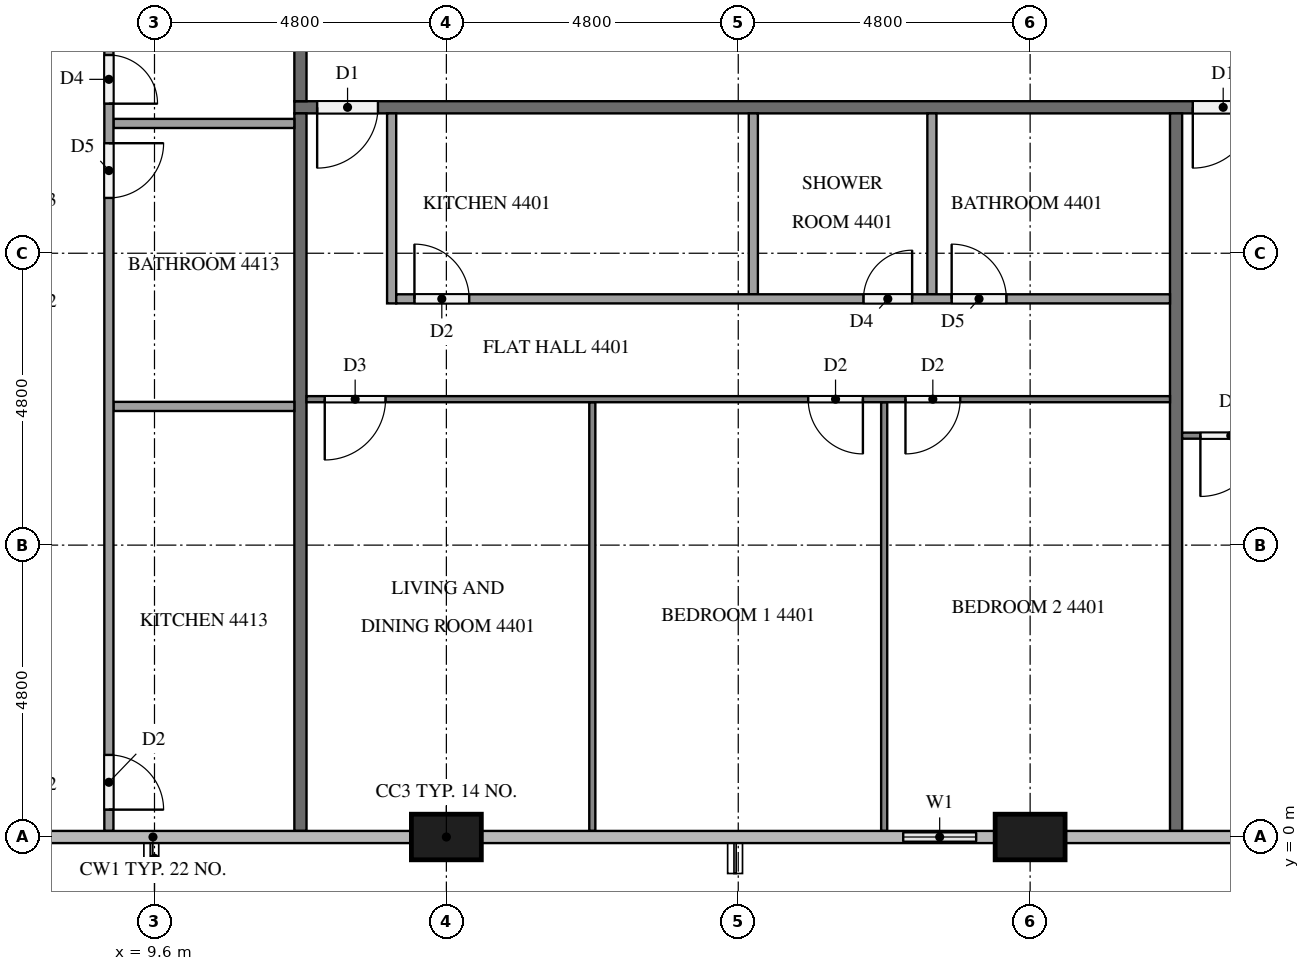
"""IFC4 building model, lengths in metres.
Left out: names, types, materials, properties, quantities, classifications, styles, units other than length and angle.
Written with IfcOpenShell. Run it as: python <this file> out.ifc"""

import sys

from ifc_helpers import new_model, si_unit, direction, frame, frame_2d, origin, origin_2d, place, context, subcontext, project, spatial, rectangle, extrude, element, fill, save


model = new_model("IFC4")
c1 = context("Model", 3, precision=1e-05, world=origin(), true_north=direction((0.0, 1.0)))
c2 = subcontext(c1, "Body", "Model", "MODEL_VIEW")
j1 = project(units=[si_unit("LENGTHUNIT", "METRE"), si_unit("PLANEANGLEUNIT", "RADIAN")], contexts=[c1])
p1 = place(None, origin())
s1 = spatial("IfcSite", under=j1, at=p1, CompositionType="ELEMENT")
p2 = place(p1, origin())
s2 = spatial("IfcBuilding", under=s1, at=p2, CompositionType="ELEMENT")
p3 = place(p2, frame((0.0, 0.0, 170.0)))
s3 = spatial("IfcBuildingStorey", under=s2, at=p3, CompositionType="ELEMENT", Elevation=170.0)
for number, where, z_axis, x_axis in (
    (1, (14.4, 0.0, 0.0), (0.0, 0.0, 1.0), (1.0, 0.0, 0.0)),
    (2, (24.0, 0.0, 0.0), (0.0, 0.0, 1.0), (1.0, 0.0, 0.0)),
):
    element("IfcColumn", number, at=place(p3, frame(where, z_axis=z_axis, x_axis=x_axis)), inside=s3, PredefinedType="COLUMN", context=c2, shape_type="SweptSolid", body=[
        extrude(rectangle(XDim=1.15, YDim=0.75, at=origin_2d()), origin(), (0.0, 0.0, 1.0), 3.1),
    ])
p4 = place(p3, frame((21.6, 0.0, 0.0), z_axis=(0.0, 0.0, 1.0), x_axis=(1.0, 0.0, 0.0)))
e3 = element("IfcWall", 3, at=p4, inside=s3, PredefinedType="SOLIDWALL", context=c2, shape_type="SweptSolid", body=[
    extrude(rectangle(XDim=1.825, YDim=0.15, at=frame_2d((0.913, 0.0))), origin(), (0.0, 0.0, 1.0), 3.1),
])
p5 = place(p4, frame((0.312, 0.0, 0.9)))
e4 = element("IfcOpeningElement", 4, at=p5, cuts=e3, PredefinedType="OPENING", context=c2, shape_type="SweptSolid", body=[
    extrude(rectangle(XDim=1.2, YDim=1.4, at=frame_2d((0.6, 0.7))), frame((0.0, 0.085, 0.0), z_axis=(0.0, -1.0, 0.0), x_axis=(1.0, 0.0, 0.0)), (0.0, 0.0, 1.0), 0.17),
])
p6 = place(p3, frame((50.5, 12.0, 0.0), z_axis=(0.0, 0.0, 1.0), x_axis=(-1.0, 0.0, 0.0)))
e5 = element("IfcWall", 5, at=p6, inside=s3, PredefinedType="PARTITIONING", context=c2, shape_type="SweptSolid", body=[
    extrude(rectangle(XDim=38.6, YDim=0.2, at=frame_2d((19.3, 0.0))), origin(), (0.0, 0.0, 1.0), 3.1),
])
p7 = place(p6, frame((37.225, 0.0, 0.0)))
e6 = element("IfcOpeningElement", 6, at=p7, cuts=e5, PredefinedType="OPENING", context=c2, shape_type="SweptSolid", body=[
    extrude(rectangle(XDim=1.0, YDim=2.1, at=frame_2d((0.5, 1.05))), frame((0.0, 0.11, 0.0), z_axis=(0.0, -1.0, 0.0), x_axis=(1.0, 0.0, 0.0)), (0.0, 0.0, 1.0), 0.22),
])
p8 = place(p6, frame((22.825, 0.0, 0.0)))
e7 = element("IfcOpeningElement", 7, at=p8, cuts=e5, PredefinedType="OPENING", context=c2, shape_type="SweptSolid", body=[
    extrude(rectangle(XDim=1.0, YDim=2.1, at=frame_2d((0.5, 1.05))), frame((0.0, 0.11, 0.0), z_axis=(0.0, -1.0, 0.0), x_axis=(1.0, 0.0, 0.0)), (0.0, 0.0, 1.0), 0.22),
])
p9 = place(p6, frame((8.425, 0.0, 0.0)))
e8 = element("IfcOpeningElement", 8, at=p9, cuts=e5, PredefinedType="OPENING", context=c2, shape_type="SweptSolid", body=[
    extrude(rectangle(XDim=1.0, YDim=2.1, at=frame_2d((0.5, 1.05))), frame((0.0, 0.11, 0.0), z_axis=(0.0, -1.0, 0.0), x_axis=(1.0, 0.0, 0.0)), (0.0, 0.0, 1.0), 0.22),
])
p10 = place(p3, frame((12.0, 12.1, 0.0), z_axis=(0.0, 0.0, 1.0), x_axis=(0.0, 1.0, 0.0)))
e9 = element("IfcWall", 9, at=p10, inside=s3, PredefinedType="PARTITIONING", context=c2, shape_type="SweptSolid", body=[
    extrude(rectangle(XDim=28.6, YDim=0.2, at=frame_2d((14.3, 0.0))), origin(), (0.0, 0.0, 1.0), 3.1),
])
p11 = place(p10, frame((19.375, 0.0, 0.0)))
e10 = element("IfcOpeningElement", 10, at=p11, cuts=e9, PredefinedType="OPENING", context=c2, shape_type="SweptSolid", body=[
    extrude(rectangle(XDim=1.0, YDim=2.1, at=frame_2d((0.5, 1.05))), frame((0.0, 0.11, 0.0), z_axis=(0.0, -1.0, 0.0), x_axis=(1.0, 0.0, 0.0)), (0.0, 0.0, 1.0), 0.22),
])
p12 = place(p10, frame((4.975, 0.0, 0.0)))
e11 = element("IfcOpeningElement", 11, at=p12, cuts=e9, PredefinedType="OPENING", context=c2, shape_type="SweptSolid", body=[
    extrude(rectangle(XDim=1.0, YDim=2.1, at=frame_2d((0.5, 1.05))), frame((0.0, 0.11, 0.0), z_axis=(0.0, -1.0, 0.0), x_axis=(1.0, 0.0, 0.0)), (0.0, 0.0, 1.0), 0.22),
])
p13 = place(p10, frame((3.425, 0.0, 0.0)))
e12 = element("IfcOpeningElement", 12, at=p13, cuts=e9, PredefinedType="OPENING", context=c2, shape_type="SweptSolid", body=[
    extrude(rectangle(XDim=1.0, YDim=2.1, at=frame_2d((0.5, 1.05))), frame((0.0, 0.11, 0.0), z_axis=(0.0, -1.0, 0.0), x_axis=(1.0, 0.0, 0.0)), (0.0, 0.0, 1.0), 0.22),
])
for number, where, z_axis, x_axis in (
    (13, (26.4, 11.9, 0.0), (0.0, 0.0, 1.0), (0.0, -1.0, 0.0)),
    (14, (12.0, 0.1, 0.0), (0.0, 0.0, 1.0), (0.0, 1.0, 0.0)),
):
    element("IfcWall", number, at=place(p3, frame(where, z_axis=z_axis, x_axis=x_axis)), inside=s3, PredefinedType="PARTITIONING", context=c2, shape_type="SweptSolid", body=[
        extrude(rectangle(XDim=11.8, YDim=0.2, at=frame_2d((5.9, 0.0))), origin(), (0.0, 0.0, 1.0), 3.1),
    ])
for number, where, z_axis, x_axis in (
    (15, (16.8, 7.15, 0.0), (0.0, 0.0, 1.0), (0.0, -1.0, 0.0)),
    (16, (21.6, 7.15, 0.0), (0.0, 0.0, 1.0), (0.0, -1.0, 0.0)),
):
    element("IfcWall", number, at=place(p3, frame(where, z_axis=z_axis, x_axis=x_axis)), inside=s3, PredefinedType="PARTITIONING", context=c2, shape_type="SweptSolid", body=[
        extrude(rectangle(XDim=7.05, YDim=0.1, at=frame_2d((3.525, 0.0))), origin(), (0.0, 0.0, 1.0), 3.1),
    ])
p14 = place(p3, frame((26.3, 7.2, 0.0), z_axis=(0.0, 0.0, 1.0), x_axis=(-1.0, 0.0, 0.0)))
e17 = element("IfcWall", 17, at=p14, inside=s3, PredefinedType="PARTITIONING", context=c2, shape_type="SweptSolid", body=[
    extrude(rectangle(XDim=14.2, YDim=0.1, at=frame_2d((7.1, 0.0))), origin(), (0.0, 0.0, 1.0), 3.1),
])
p15 = place(p14, frame((12.9, 0.0, 0.0)))
e18 = element("IfcOpeningElement", 18, at=p15, cuts=e17, PredefinedType="OPENING", context=c2, shape_type="SweptSolid", body=[
    extrude(rectangle(XDim=1.0, YDim=2.1, at=frame_2d((0.5, 1.05))), frame((0.0, 0.06, 0.0), z_axis=(0.0, -1.0, 0.0), x_axis=(1.0, 0.0, 0.0)), (0.0, 0.0, 1.0), 0.12),
])
p16 = place(p14, frame((5.05, 0.0, 0.0)))
e19 = element("IfcOpeningElement", 19, at=p16, cuts=e17, PredefinedType="OPENING", context=c2, shape_type="SweptSolid", body=[
    extrude(rectangle(XDim=0.9, YDim=2.1, at=frame_2d((0.45, 1.05))), frame((0.0, 0.06, 0.0), z_axis=(0.0, -1.0, 0.0), x_axis=(1.0, 0.0, 0.0)), (0.0, 0.0, 1.0), 0.12),
])
p17 = place(p14, frame((3.45, 0.0, 0.0)))
e20 = element("IfcOpeningElement", 20, at=p17, cuts=e17, PredefinedType="OPENING", context=c2, shape_type="SweptSolid", body=[
    extrude(rectangle(XDim=0.9, YDim=2.1, at=frame_2d((0.45, 1.05))), frame((0.0, 0.06, 0.0), z_axis=(0.0, -1.0, 0.0), x_axis=(1.0, 0.0, 0.0)), (0.0, 0.0, 1.0), 0.12),
])
for number, where, z_axis, x_axis in (
    (21, (19.448, 11.9, 0.0), (0.0, 0.0, 1.0), (0.0, -1.0, 0.0)),
    (22, (22.385, 11.9, 0.0), (0.0, 0.0, 1.0), (0.0, -1.0, 0.0)),
):
    element("IfcWall", number, at=place(p3, frame(where, z_axis=z_axis, x_axis=x_axis)), inside=s3, PredefinedType="PARTITIONING", context=c2, shape_type="SweptSolid", body=[
        extrude(rectangle(XDim=2.975, YDim=0.15, at=frame_2d((1.487, 0.0))), origin(), (0.0, 0.0, 1.0), 3.1),
    ])
p18 = place(p3, frame((13.5, 11.9, 0.0), z_axis=(0.0, 0.0, 1.0), x_axis=(0.0, -1.0, 0.0)))
e23 = element("IfcWall", 23, at=p18, inside=s3, PredefinedType="PARTITIONING", context=c2, shape_type="SweptSolid", body=[
    extrude(rectangle(XDim=3.125, YDim=0.15, at=frame_2d((1.562, 0.0))), origin(), (0.0, 0.0, 1.0), 3.1),
])
p19 = place(p3, frame((13.575, 8.85, 0.0), z_axis=(0.0, 0.0, 1.0), x_axis=(1.0, 0.0, 0.0)))
e24 = element("IfcWall", 24, at=p19, inside=s3, PredefinedType="PARTITIONING", context=c2, shape_type="SweptSolid", body=[
    extrude(rectangle(XDim=12.725, YDim=0.15, at=frame_2d((6.363, 0.0))), origin(), (0.0, 0.0, 1.0), 3.1),
])
p20 = place(p19, frame((0.3, 0.0, 0.0)))
e25 = element("IfcOpeningElement", 25, at=p20, cuts=e24, PredefinedType="OPENING", context=c2, shape_type="SweptSolid", body=[
    extrude(rectangle(XDim=0.9, YDim=2.1, at=frame_2d((0.45, 1.05))), frame((0.0, 0.085, 0.0), z_axis=(0.0, -1.0, 0.0), x_axis=(1.0, 0.0, 0.0)), (0.0, 0.0, 1.0), 0.17),
])
p21 = place(p19, frame((7.685, 0.0, 0.0)))
e26 = element("IfcOpeningElement", 26, at=p21, cuts=e24, PredefinedType="OPENING", context=c2, shape_type="SweptSolid", body=[
    extrude(rectangle(XDim=0.8, YDim=2.1, at=frame_2d((0.4, 1.05))), frame((0.0, 0.085, 0.0), z_axis=(0.0, -1.0, 0.0), x_axis=(1.0, 0.0, 0.0)), (0.0, 0.0, 1.0), 0.17),
])
p22 = place(p19, frame((9.135, 0.0, 0.0)))
e27 = element("IfcOpeningElement", 27, at=p22, cuts=e24, PredefinedType="OPENING", context=c2, shape_type="SweptSolid", body=[
    extrude(rectangle(XDim=0.9, YDim=2.1, at=frame_2d((0.45, 1.05))), frame((0.0, 0.085, 0.0), z_axis=(0.0, -1.0, 0.0), x_axis=(1.0, 0.0, 0.0)), (0.0, 0.0, 1.0), 0.17),
])
p23 = place(p3, frame((40.7, 6.6, 0.0), z_axis=(0.0, 0.0, 1.0), x_axis=(-1.0, 0.0, 0.0)))
e28 = element("IfcWall", 28, at=p23, inside=s3, PredefinedType="PARTITIONING", context=c2, shape_type="SweptSolid", body=[
    extrude(rectangle(XDim=14.2, YDim=0.1, at=frame_2d((7.1, 0.0))), origin(), (0.0, 0.0, 1.0), 3.1),
])
p24 = place(p23, frame((12.9, 0.0, 0.0)))
e29 = element("IfcOpeningElement", 29, at=p24, cuts=e28, PredefinedType="OPENING", context=c2, shape_type="SweptSolid", body=[
    extrude(rectangle(XDim=1.0, YDim=2.1, at=frame_2d((0.5, 1.05))), frame((0.0, 0.06, 0.0), z_axis=(0.0, -1.0, 0.0), x_axis=(1.0, 0.0, 0.0)), (0.0, 0.0, 1.0), 0.12),
])
p25 = place(p23, frame((5.05, 0.0, 0.0)))
e30 = element("IfcOpeningElement", 30, at=p25, cuts=e28, PredefinedType="OPENING", context=c2, shape_type="SweptSolid", body=[
    extrude(rectangle(XDim=0.9, YDim=2.1, at=frame_2d((0.45, 1.05))), frame((0.0, 0.06, 0.0), z_axis=(0.0, -1.0, 0.0), x_axis=(1.0, 0.0, 0.0)), (0.0, 0.0, 1.0), 0.12),
])
p26 = place(p23, frame((3.45, 0.0, 0.0)))
e31 = element("IfcOpeningElement", 31, at=p26, cuts=e28, PredefinedType="OPENING", context=c2, shape_type="SweptSolid", body=[
    extrude(rectangle(XDim=0.9, YDim=2.1, at=frame_2d((0.45, 1.05))), frame((0.0, 0.06, 0.0), z_axis=(0.0, -1.0, 0.0), x_axis=(1.0, 0.0, 0.0)), (0.0, 0.0, 1.0), 0.12),
])
for number, where, z_axis, x_axis in (
    (32, (11.9, 11.735, 0.0), (0.0, 0.0, 1.0), (-1.0, 0.0, 0.0)),
    (33, (11.9, 7.081, 0.0), (0.0, 0.0, 1.0), (-1.0, 0.0, 0.0)),
):
    element("IfcWall", number, at=place(p3, frame(where, z_axis=z_axis, x_axis=x_axis)), inside=s3, PredefinedType="PARTITIONING", context=c2, shape_type="SweptSolid", body=[
        extrude(rectangle(XDim=2.975, YDim=0.15, at=frame_2d((1.487, 0.0))), origin(), (0.0, 0.0, 1.0), 3.1),
    ])
p27 = place(p3, frame((8.85, 15.225, 0.0), z_axis=(0.0, 0.0, 1.0), x_axis=(0.0, -1.0, 0.0)))
e34 = element("IfcWall", 34, at=p27, inside=s3, PredefinedType="PARTITIONING", context=c2, shape_type="SweptSolid", body=[
    extrude(rectangle(XDim=15.125, YDim=0.15, at=frame_2d((7.562, 0.0))), origin(), (0.0, 0.0, 1.0), 3.1),
])
p28 = place(p27, frame((2.365, 0.0, 0.0)))
e35 = element("IfcOpeningElement", 35, at=p28, cuts=e34, PredefinedType="OPENING", context=c2, shape_type="SweptSolid", body=[
    extrude(rectangle(XDim=0.8, YDim=2.1, at=frame_2d((0.4, 1.05))), frame((0.0, 0.085, 0.0), z_axis=(0.0, -1.0, 0.0), x_axis=(1.0, 0.0, 0.0)), (0.0, 0.0, 1.0), 0.17),
])
p29 = place(p27, frame((3.815, 0.0, 0.0)))
e36 = element("IfcOpeningElement", 36, at=p29, cuts=e34, PredefinedType="OPENING", context=c2, shape_type="SweptSolid", body=[
    extrude(rectangle(XDim=0.9, YDim=2.1, at=frame_2d((0.45, 1.05))), frame((0.0, 0.085, 0.0), z_axis=(0.0, -1.0, 0.0), x_axis=(1.0, 0.0, 0.0)), (0.0, 0.0, 1.0), 0.17),
])
p30 = place(p27, frame((13.875, 0.0, 0.0)))
e37 = element("IfcOpeningElement", 37, at=p30, cuts=e34, PredefinedType="OPENING", context=c2, shape_type="SweptSolid", body=[
    extrude(rectangle(XDim=0.9, YDim=2.1, at=frame_2d((0.45, 1.05))), frame((0.0, 0.085, 0.0), z_axis=(0.0, -1.0, 0.0), x_axis=(1.0, 0.0, 0.0)), (0.0, 0.0, 1.0), 0.17),
])
p31 = place(p5, origin())
e38 = element("IfcWindow", 38, at=p31, inside=s3, PartitioningType="SINGLE_PANEL", PredefinedType="WINDOW", context=c2, shape_type="SweptSolid", body=[
    extrude(rectangle(XDim=1.2, YDim=1.4, at=frame_2d((0.6, 0.7))), frame((0.0, 0.03, 0.0), z_axis=(0.0, -1.0, 0.0), x_axis=(1.0, 0.0, 0.0)), (0.0, 0.0, 1.0), 0.06),
])
fill(e4, e38)
p32 = place(p7, origin())
e39 = element("IfcDoor", 39, at=p32, inside=s3, OperationType="SINGLE_SWING_RIGHT", PredefinedType="DOOR", context=c2, shape_type="SweptSolid", body=[
    extrude(rectangle(XDim=1.0, YDim=2.1, at=frame_2d((0.5, 1.05))), frame((0.0, 0.025, 0.0), z_axis=(0.0, -1.0, 0.0), x_axis=(1.0, 0.0, 0.0)), (0.0, 0.0, 1.0), 0.05),
])
fill(e6, e39)
p33 = place(p8, origin())
e40 = element("IfcDoor", 40, at=p33, inside=s3, OperationType="SINGLE_SWING_RIGHT", PredefinedType="DOOR", context=c2, shape_type="SweptSolid", body=[
    extrude(rectangle(XDim=1.0, YDim=2.1, at=frame_2d((0.5, 1.05))), frame((0.0, 0.025, 0.0), z_axis=(0.0, -1.0, 0.0), x_axis=(1.0, 0.0, 0.0)), (0.0, 0.0, 1.0), 0.05),
])
fill(e7, e40)
p34 = place(p15, origin())
e41 = element("IfcDoor", 41, at=p34, inside=s3, OperationType="SINGLE_SWING_RIGHT", PredefinedType="DOOR", context=c2, shape_type="SweptSolid", body=[
    extrude(rectangle(XDim=1.0, YDim=2.1, at=frame_2d((0.5, 1.05))), frame((0.0, 0.025, 0.0), z_axis=(0.0, -1.0, 0.0), x_axis=(1.0, 0.0, 0.0)), (0.0, 0.0, 1.0), 0.05),
])
fill(e18, e41)
p35 = place(p16, origin())
e42 = element("IfcDoor", 42, at=p35, inside=s3, OperationType="SINGLE_SWING_LEFT", PredefinedType="DOOR", context=c2, shape_type="SweptSolid", body=[
    extrude(rectangle(XDim=0.9, YDim=2.1, at=frame_2d((0.45, 1.05))), frame((0.0, 0.025, 0.0), z_axis=(0.0, -1.0, 0.0), x_axis=(1.0, 0.0, 0.0)), (0.0, 0.0, 1.0), 0.05),
])
fill(e19, e42)
p36 = place(p17, origin())
e43 = element("IfcDoor", 43, at=p36, inside=s3, OperationType="SINGLE_SWING_RIGHT", PredefinedType="DOOR", context=c2, shape_type="SweptSolid", body=[
    extrude(rectangle(XDim=0.9, YDim=2.1, at=frame_2d((0.45, 1.05))), frame((0.0, 0.025, 0.0), z_axis=(0.0, -1.0, 0.0), x_axis=(1.0, 0.0, 0.0)), (0.0, 0.0, 1.0), 0.05),
])
fill(e20, e43)
p37 = place(p20, origin())
e44 = element("IfcDoor", 44, at=p37, inside=s3, OperationType="SINGLE_SWING_LEFT", PredefinedType="DOOR", context=c2, shape_type="SweptSolid", body=[
    extrude(rectangle(XDim=0.9, YDim=2.1, at=frame_2d((0.45, 1.05))), frame((0.0, 0.025, 0.0), z_axis=(0.0, -1.0, 0.0), x_axis=(1.0, 0.0, 0.0)), (0.0, 0.0, 1.0), 0.05),
])
fill(e25, e44)
p38 = place(p21, origin())
e45 = element("IfcDoor", 45, at=p38, inside=s3, OperationType="SINGLE_SWING_RIGHT", PredefinedType="DOOR", context=c2, shape_type="SweptSolid", body=[
    extrude(rectangle(XDim=0.8, YDim=2.1, at=frame_2d((0.4, 1.05))), frame((0.0, 0.025, 0.0), z_axis=(0.0, -1.0, 0.0), x_axis=(1.0, 0.0, 0.0)), (0.0, 0.0, 1.0), 0.05),
])
fill(e26, e45)
p39 = place(p22, origin())
e46 = element("IfcDoor", 46, at=p39, inside=s3, OperationType="SINGLE_SWING_LEFT", PredefinedType="DOOR", context=c2, shape_type="SweptSolid", body=[
    extrude(rectangle(XDim=0.9, YDim=2.1, at=frame_2d((0.45, 1.05))), frame((0.0, 0.025, 0.0), z_axis=(0.0, -1.0, 0.0), x_axis=(1.0, 0.0, 0.0)), (0.0, 0.0, 1.0), 0.05),
])
fill(e27, e46)
p40 = place(p24, origin())
e47 = element("IfcDoor", 47, at=p40, inside=s3, OperationType="SINGLE_SWING_RIGHT", PredefinedType="DOOR", context=c2, shape_type="SweptSolid", body=[
    extrude(rectangle(XDim=1.0, YDim=2.1, at=frame_2d((0.5, 1.05))), frame((0.0, 0.025, 0.0), z_axis=(0.0, -1.0, 0.0), x_axis=(1.0, 0.0, 0.0)), (0.0, 0.0, 1.0), 0.05),
])
fill(e29, e47)
p41 = place(p28, origin())
e48 = element("IfcDoor", 48, at=p41, inside=s3, OperationType="SINGLE_SWING_RIGHT", PredefinedType="DOOR", context=c2, shape_type="SweptSolid", body=[
    extrude(rectangle(XDim=0.8, YDim=2.1, at=frame_2d((0.4, 1.05))), frame((0.0, 0.025, 0.0), z_axis=(0.0, -1.0, 0.0), x_axis=(1.0, 0.0, 0.0)), (0.0, 0.0, 1.0), 0.05),
])
fill(e35, e48)
p42 = place(p29, origin())
e49 = element("IfcDoor", 49, at=p42, inside=s3, OperationType="SINGLE_SWING_LEFT", PredefinedType="DOOR", context=c2, shape_type="SweptSolid", body=[
    extrude(rectangle(XDim=0.9, YDim=2.1, at=frame_2d((0.45, 1.05))), frame((0.0, 0.025, 0.0), z_axis=(0.0, -1.0, 0.0), x_axis=(1.0, 0.0, 0.0)), (0.0, 0.0, 1.0), 0.05),
])
fill(e36, e49)
p43 = place(p30, origin())
e50 = element("IfcDoor", 50, at=p43, inside=s3, OperationType="SINGLE_SWING_RIGHT", PredefinedType="DOOR", context=c2, shape_type="SweptSolid", body=[
    extrude(rectangle(XDim=0.9, YDim=2.1, at=frame_2d((0.45, 1.05))), frame((0.0, 0.025, 0.0), z_axis=(0.0, -1.0, 0.0), x_axis=(1.0, 0.0, 0.0)), (0.0, 0.0, 1.0), 0.05),
])
fill(e37, e50)
save(model, sys.argv[1])
